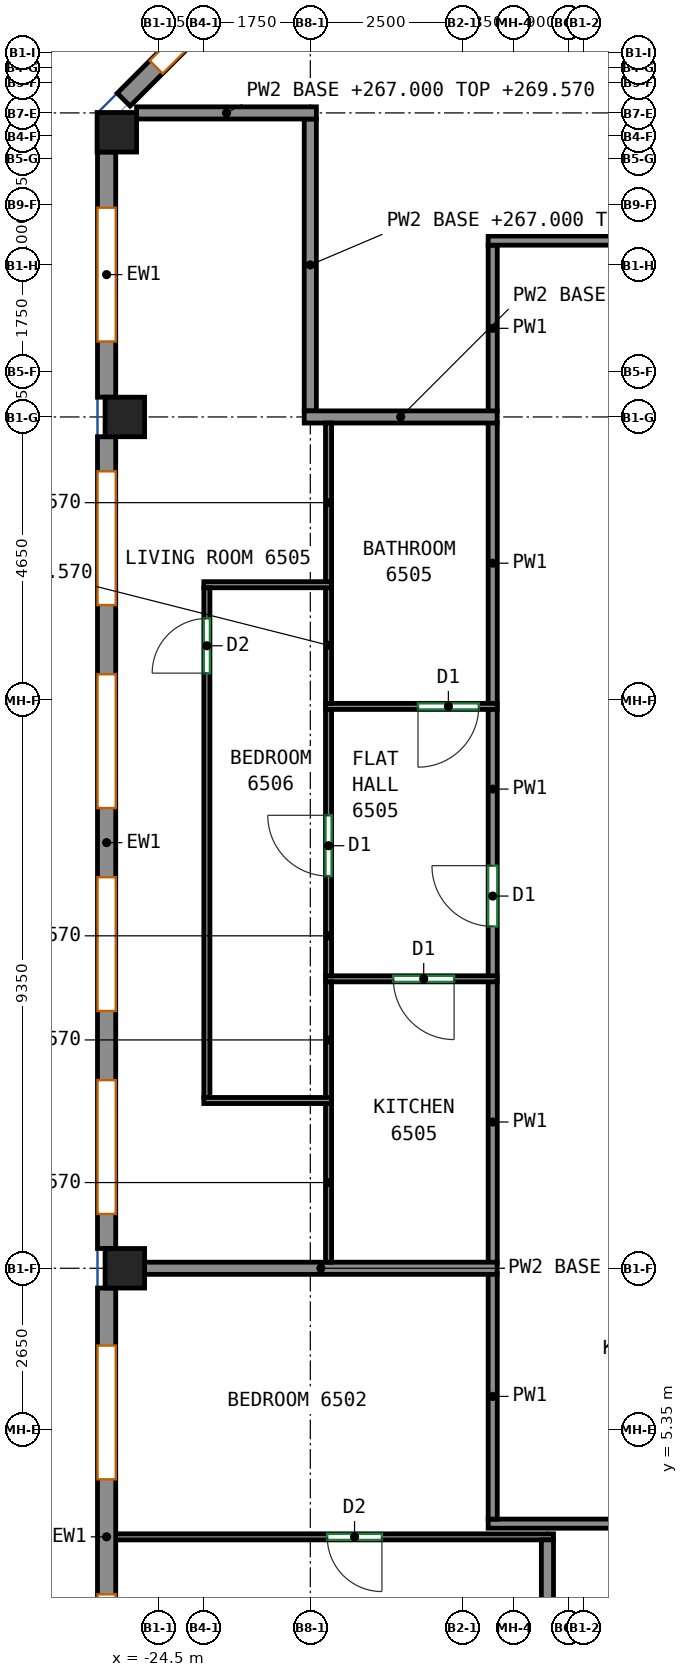
"""IFC4 building model, lengths in metres.
Left out: names, types, materials, properties, quantities, classifications, styles, units other than length and angle.
Written with IfcOpenShell. Run it as: python <this file> out.ifc"""

import sys

from ifc_helpers import new_model, si_unit, direction, frame, frame_2d, origin, origin_2d, place, context, subcontext, project, spatial, rectangle, extrude, source, transform, mapped, element, fill, save


model = new_model("IFC4")
c1 = context("Model", 3, precision=1e-05, world=origin(), true_north=direction((0.0, 1.0)))
c2 = subcontext(c1, "Body", "Model", "MODEL_VIEW")
j1 = project(units=[si_unit("LENGTHUNIT", "METRE"), si_unit("PLANEANGLEUNIT", "RADIAN")], contexts=[c1])
p1 = place(None, origin())
s1 = spatial("IfcSite", under=j1, at=p1, CompositionType="ELEMENT")
p2 = place(p1, origin())
s2 = spatial("IfcBuilding", under=s1, at=p2, CompositionType="ELEMENT")
p3 = place(p2, frame((0.0, 0.0, 267.0)))
s3 = spatial("IfcBuildingStorey", under=s2, at=p3, CompositionType="ELEMENT", Elevation=267.0)
m1 = source(origin(), c2, "Body", "SweptSolid", [
    extrude(rectangle(XDim=0.65, YDim=0.65, at=origin_2d()), origin(), (0.0, 0.0, 1.0), 3.12),
])
for number, where, z_axis, x_axis in (
    (1, (-25.182, 26.682, 0.0), (0.0, 0.0, 1.0), (1.0, 0.0, 0.0)),
    (2, (-25.05, 8.0, 0.0), (0.0, 0.0, 1.0), (1.0, 0.0, 0.0)),
    (3, (-25.05, 22.0, 0.0), (0.0, 0.0, 1.0), (1.0, 0.0, 0.0)),
):
    element("IfcColumn", number, at=place(p3, frame(where, z_axis=z_axis, x_axis=x_axis)), inside=s3, PredefinedType="COLUMN", context=c2, shape_type="MappedRepresentation", body=[
        mapped(m1, transform((0.0, 0.0, 0.0))),
    ])
m2 = source(origin(), c2, "Body", "SweptSolid", [
    extrude(rectangle(XDim=3.712, YDim=0.3, at=frame_2d((1.856, 0.0))), origin(), (0.0, 0.0, 1.0), 3.12),
])
p4 = place(p3, frame((-22.444, 29.844, 0.0), z_axis=(0.0, 0.0, 1.0), x_axis=(-0.707106781187, -0.707106781187, 0.0)))
e4 = element("IfcWall", 4, at=p4, inside=s3, PredefinedType="SOLIDWALL", context=c2, shape_type="MappedRepresentation", body=[
    mapped(m2, transform((0.0, 0.0, 0.0))),
])
p5 = place(p4, frame((0.756, 0.0, 0.8)))
e5 = element("IfcOpeningElement", 5, at=p5, cuts=e4, PredefinedType="OPENING", context=c2, shape_type="SweptSolid", body=[
    extrude(rectangle(XDim=2.2, YDim=2.05, at=frame_2d((1.1, 1.025))), frame((0.0, 0.16, 0.0), z_axis=(0.0, -1.0, 0.0), x_axis=(1.0, 0.0, 0.0)), (0.0, 0.0, 1.0), 0.32),
])
m3 = source(origin(), c2, "Body", "SweptSolid", [
    extrude(rectangle(XDim=4.032, YDim=0.3, at=frame_2d((2.016, 0.0))), origin(), (0.0, 0.0, 1.0), 3.12),
])
p6 = place(p3, frame((-25.35, 26.357, 0.0), z_axis=(0.0, 0.0, 1.0), x_axis=(0.0, -1.0, 0.0)))
e6 = element("IfcWall", 6, at=p6, inside=s3, PredefinedType="SOLIDWALL", context=c2, shape_type="MappedRepresentation", body=[
    mapped(m3, transform((0.0, 0.0, 0.0))),
])
p7 = place(p6, frame((0.916, 0.0, 0.8)))
e7 = element("IfcOpeningElement", 7, at=p7, cuts=e6, PredefinedType="OPENING", context=c2, shape_type="SweptSolid", body=[
    extrude(rectangle(XDim=2.2, YDim=2.05, at=frame_2d((1.1, 1.025))), frame((0.0, 0.16, 0.0), z_axis=(0.0, -1.0, 0.0), x_axis=(1.0, 0.0, 0.0)), (0.0, 0.0, 1.0), 0.32),
])
m4 = source(origin(), c2, "Body", "SweptSolid", [
    extrude(rectangle(XDim=13.35, YDim=0.3, at=frame_2d((6.675, 0.0))), origin(), (0.0, 0.0, 1.0), 3.12),
])
p8 = place(p3, frame((-25.35, 21.675, 0.0), z_axis=(0.0, 0.0, 1.0), x_axis=(0.0, -1.0, 0.0)))
e8 = element("IfcWall", 8, at=p8, inside=s3, PredefinedType="SOLIDWALL", context=c2, shape_type="MappedRepresentation", body=[
    mapped(m4, transform((0.0, 0.0, 0.0))),
])
p9 = place(p8, frame((0.569, 0.0, 0.8)))
e9 = element("IfcOpeningElement", 9, at=p9, cuts=e8, PredefinedType="OPENING", context=c2, shape_type="SweptSolid", body=[
    extrude(rectangle(XDim=2.2, YDim=2.05, at=frame_2d((1.1, 1.025))), frame((0.0, 0.16, 0.0), z_axis=(0.0, -1.0, 0.0), x_axis=(1.0, 0.0, 0.0)), (0.0, 0.0, 1.0), 0.32),
])
p10 = place(p8, frame((3.906, 0.0, 0.8)))
e10 = element("IfcOpeningElement", 10, at=p10, cuts=e8, PredefinedType="OPENING", context=c2, shape_type="SweptSolid", body=[
    extrude(rectangle(XDim=2.2, YDim=2.05, at=frame_2d((1.1, 1.025))), frame((0.0, 0.16, 0.0), z_axis=(0.0, -1.0, 0.0), x_axis=(1.0, 0.0, 0.0)), (0.0, 0.0, 1.0), 0.32),
])
p11 = place(p8, frame((7.244, 0.0, 0.8)))
e11 = element("IfcOpeningElement", 11, at=p11, cuts=e8, PredefinedType="OPENING", context=c2, shape_type="SweptSolid", body=[
    extrude(rectangle(XDim=2.2, YDim=2.05, at=frame_2d((1.1, 1.025))), frame((0.0, 0.16, 0.0), z_axis=(0.0, -1.0, 0.0), x_axis=(1.0, 0.0, 0.0)), (0.0, 0.0, 1.0), 0.32),
])
p12 = place(p8, frame((10.581, 0.0, 0.8)))
e12 = element("IfcOpeningElement", 12, at=p12, cuts=e8, PredefinedType="OPENING", context=c2, shape_type="SweptSolid", body=[
    extrude(rectangle(XDim=2.2, YDim=2.05, at=frame_2d((1.1, 1.025))), frame((0.0, 0.16, 0.0), z_axis=(0.0, -1.0, 0.0), x_axis=(1.0, 0.0, 0.0)), (0.0, 0.0, 1.0), 0.32),
])
m5 = source(origin(), c2, "Body", "SweptSolid", [
    extrude(rectangle(XDim=8.183, YDim=0.3, at=frame_2d((4.092, 0.0))), origin(), (0.0, 0.0, 1.0), 3.12),
])
p13 = place(p3, frame((-25.35, 7.675, 0.0), z_axis=(0.0, 0.0, 1.0), x_axis=(0.0, -1.0, 0.0)))
e13 = element("IfcWall", 13, at=p13, inside=s3, PredefinedType="SOLIDWALL", context=c2, shape_type="MappedRepresentation", body=[
    mapped(m5, transform((0.0, 0.0, 0.0))),
])
p14 = place(p13, frame((0.946, 0.0, 0.8)))
e14 = element("IfcOpeningElement", 14, at=p14, cuts=e13, PredefinedType="OPENING", context=c2, shape_type="SweptSolid", body=[
    extrude(rectangle(XDim=2.2, YDim=2.05, at=frame_2d((1.1, 1.025))), frame((0.0, 0.16, 0.0), z_axis=(0.0, -1.0, 0.0), x_axis=(1.0, 0.0, 0.0)), (0.0, 0.0, 1.0), 0.32),
])
p15 = place(p13, frame((5.037, 0.0, 0.8)))
e15 = element("IfcOpeningElement", 15, at=p15, cuts=e13, PredefinedType="OPENING", context=c2, shape_type="SweptSolid", body=[
    extrude(rectangle(XDim=2.2, YDim=2.05, at=frame_2d((1.1, 1.025))), frame((0.0, 0.16, 0.0), z_axis=(0.0, -1.0, 0.0), x_axis=(1.0, 0.0, 0.0)), (0.0, 0.0, 1.0), 0.32),
])
p16 = place(p3, frame((-19.075, 3.8, 0.0), z_axis=(0.0, 0.0, 1.0), x_axis=(1.0, 0.0, 0.0)))
e16 = element("IfcWall", 16, at=p16, inside=s3, PredefinedType="PARTITIONING", context=c2, shape_type="SweptSolid", body=[
    extrude(rectangle(XDim=4.89, YDim=0.15, at=frame_2d((2.445, 0.0))), origin(), (0.0, 0.0, 1.0), 3.12),
])
p17 = place(p3, frame((-19.0, 3.875, 0.0), z_axis=(0.0, 0.0, 1.0), x_axis=(0.0, 1.0, 0.0)))
e17 = element("IfcWall", 17, at=p17, inside=s3, PredefinedType="PARTITIONING", context=c2, shape_type="SweptSolid", body=[
    extrude(rectangle(XDim=4.035, YDim=0.15, at=frame_2d((2.018, 0.0))), origin(), (0.0, 0.0, 1.0), 3.12),
])
p18 = place(p3, frame((-19.0, 22.09, 0.0), z_axis=(0.0, 0.0, 1.0), x_axis=(0.0, 1.0, 0.0)))
e18 = element("IfcWall", 18, at=p18, inside=s3, PredefinedType="PARTITIONING", context=c2, shape_type="SweptSolid", body=[
    extrude(rectangle(XDim=2.735, YDim=0.15, at=frame_2d((1.367, 0.0))), origin(), (0.0, 0.0, 1.0), 3.12),
])
p19 = place(p3, frame((-19.075, 24.9, 0.0), z_axis=(0.0, 0.0, 1.0), x_axis=(1.0, 0.0, 0.0)))
e19 = element("IfcWall", 19, at=p19, inside=s3, PredefinedType="PARTITIONING", context=c2, shape_type="SweptSolid", body=[
    extrude(rectangle(XDim=39.75, YDim=0.15, at=frame_2d((19.875, 0.0))), origin(), (0.0, 0.0, 1.0), 3.12),
])
p20 = place(p19, frame((8.674, 0.0, 0.0)))
e20 = element("IfcOpeningElement", 20, at=p20, cuts=e19, PredefinedType="OPENING", context=c2, shape_type="SweptSolid", body=[
    extrude(rectangle(XDim=0.9, YDim=2.1, at=frame_2d((0.45, 1.05))), frame((0.0, 0.085, 0.0), z_axis=(0.0, -1.0, 0.0), x_axis=(1.0, 0.0, 0.0)), (0.0, 0.0, 1.0), 0.17),
])
p21 = place(p19, frame((13.778, 0.0, 0.0)))
e21 = element("IfcOpeningElement", 21, at=p21, cuts=e19, PredefinedType="OPENING", context=c2, shape_type="SweptSolid", body=[
    extrude(rectangle(XDim=0.9, YDim=2.1, at=frame_2d((0.45, 1.05))), frame((0.0, 0.085, 0.0), z_axis=(0.0, -1.0, 0.0), x_axis=(1.0, 0.0, 0.0)), (0.0, 0.0, 1.0), 0.17),
])
p22 = place(p3, frame((-19.0, 8.09, 0.0), z_axis=(0.0, 0.0, 1.0), x_axis=(0.0, 1.0, 0.0)))
e22 = element("IfcWall", 22, at=p22, inside=s3, PredefinedType="PARTITIONING", context=c2, shape_type="SweptSolid", body=[
    extrude(rectangle(XDim=4.63, YDim=0.15, at=frame_2d((2.315, 0.0))), origin(), (0.0, 0.0, 1.0), 3.12),
])
p23 = place(p3, frame((-19.0, 12.8, 0.0), z_axis=(0.0, 0.0, 1.0), x_axis=(0.0, 1.0, 0.0)))
e23 = element("IfcWall", 23, at=p23, inside=s3, PredefinedType="PARTITIONING", context=c2, shape_type="SweptSolid", body=[
    extrude(rectangle(XDim=4.4, YDim=0.15, at=frame_2d((2.2, 0.0))), origin(), (0.0, 0.0, 1.0), 3.12),
])
p24 = place(p23, frame((0.821, 0.0, 0.0)))
e24 = element("IfcOpeningElement", 24, at=p24, cuts=e23, PredefinedType="OPENING", context=c2, shape_type="SweptSolid", body=[
    extrude(rectangle(XDim=1.0, YDim=2.1, at=frame_2d((0.5, 1.05))), frame((0.0, 0.085, 0.0), z_axis=(0.0, -1.0, 0.0), x_axis=(1.0, 0.0, 0.0)), (0.0, 0.0, 1.0), 0.17),
])
p25 = place(p3, frame((-19.0, 17.28, 0.0), z_axis=(0.0, 0.0, 1.0), x_axis=(0.0, 1.0, 0.0)))
e25 = element("IfcWall", 25, at=p25, inside=s3, PredefinedType="PARTITIONING", context=c2, shape_type="SweptSolid", body=[
    extrude(rectangle(XDim=4.63, YDim=0.15, at=frame_2d((2.315, 0.0))), origin(), (0.0, 0.0, 1.0), 3.12),
])
p26 = place(p3, frame((-18.0, 3.583, 0.0), z_axis=(0.0, 0.0, 1.0), x_axis=(-1.0, 0.0, 0.0)))
e26 = element("IfcWall", 26, at=p26, inside=s3, PredefinedType="PARTITIONING", context=c2, shape_type="SweptSolid", body=[
    extrude(rectangle(XDim=7.25, YDim=0.1, at=frame_2d((3.625, 0.0))), origin(), (0.0, 0.0, 1.0), 3.12),
])
p27 = place(p26, frame((2.822, 0.0, 0.0)))
e27 = element("IfcOpeningElement", 27, at=p27, cuts=e26, PredefinedType="OPENING", context=c2, shape_type="SweptSolid", body=[
    extrude(rectangle(XDim=0.9, YDim=2.1, at=frame_2d((0.45, 1.05))), frame((0.0, 0.06, 0.0), z_axis=(0.0, -1.0, 0.0), x_axis=(1.0, 0.0, 0.0)), (0.0, 0.0, 1.0), 0.12),
])
p28 = place(p3, frame((-18.1, -3.148, 0.0), z_axis=(0.0, 0.0, 1.0), x_axis=(0.0, 1.0, 0.0)))
e28 = element("IfcWall", 28, at=p28, inside=s3, PredefinedType="PARTITIONING", context=c2, shape_type="SweptSolid", body=[
    extrude(rectangle(XDim=6.681, YDim=0.2, at=frame_2d((3.34, 0.0))), origin(), (0.0, 0.0, 1.0), 3.12),
])
p29 = place(p3, frame((-24.725, 8.0, 0.0), z_axis=(0.0, 0.0, 1.0), x_axis=(1.0, 0.0, 0.0)))
e29 = element("IfcWall", 29, at=p29, inside=s3, PredefinedType="PARTITIONING", context=c2, shape_type="SweptSolid", body=[
    extrude(rectangle(XDim=5.798, YDim=0.2, at=frame_2d((2.899, 0.0))), origin(), (0.0, 0.0, 1.0), 2.57),
])
p30 = place(p3, frame((-22.0, 22.1, 0.0), z_axis=(0.0, 0.0, 1.0), x_axis=(0.0, 1.0, 0.0)))
e30 = element("IfcWall", 30, at=p30, inside=s3, PredefinedType="PARTITIONING", context=c2, shape_type="SweptSolid", body=[
    extrude(rectangle(XDim=4.8, YDim=0.2, at=frame_2d((2.4, 0.0))), origin(), (0.0, 0.0, 1.0), 2.57),
])
p31 = place(p3, frame((-24.857, 27.0, 0.0), z_axis=(0.0, 0.0, 1.0), x_axis=(1.0, 0.0, 0.0)))
e31 = element("IfcWall", 31, at=p31, inside=s3, PredefinedType="PARTITIONING", context=c2, shape_type="SweptSolid", body=[
    extrude(rectangle(XDim=2.957, YDim=0.2, at=frame_2d((1.479, 0.0))), origin(), (0.0, 0.0, 1.0), 2.57),
])
p32 = place(p3, frame((-22.1, 22.0, 0.0), z_axis=(0.0, 0.0, 1.0), x_axis=(1.0, 0.0, 0.0)))
e32 = element("IfcWall", 32, at=p32, inside=s3, PredefinedType="PARTITIONING", context=c2, shape_type="SweptSolid", body=[
    extrude(rectangle(XDim=3.173, YDim=0.2, at=frame_2d((1.586, 0.0))), origin(), (0.0, 0.0, 1.0), 2.57),
])
p33 = place(p3, frame((-18.927, 12.76, 0.0), z_axis=(0.0, 0.0, 1.0), x_axis=(-1.0, 0.0, 0.0)))
e33 = element("IfcWall", 33, at=p33, inside=s3, PredefinedType="PARTITIONING", context=c2, shape_type="SweptSolid", body=[
    extrude(rectangle(XDim=2.823, YDim=0.1, at=frame_2d((1.412, 0.0))), origin(), (0.0, 0.0, 1.0), 3.12),
])
p34 = place(p33, frame((0.708, 0.0, 0.0)))
e34 = element("IfcOpeningElement", 34, at=p34, cuts=e33, PredefinedType="OPENING", context=c2, shape_type="SweptSolid", body=[
    extrude(rectangle(XDim=1.0, YDim=2.1, at=frame_2d((0.5, 1.05))), frame((0.0, 0.06, 0.0), z_axis=(0.0, -1.0, 0.0), x_axis=(1.0, 0.0, 0.0)), (0.0, 0.0, 1.0), 0.12),
])
p35 = place(p3, frame((-21.7, 8.1, 0.0), z_axis=(0.0, 0.0, 1.0), x_axis=(0.0, 1.0, 0.0)))
e35 = element("IfcWall", 35, at=p35, inside=s3, PredefinedType="PARTITIONING", context=c2, shape_type="SweptSolid", body=[
    extrude(rectangle(XDim=2.619, YDim=0.1, at=frame_2d((1.31, 0.0))), origin(), (0.0, 0.0, 1.0), 2.57),
])
p36 = place(p3, frame((-21.7, 10.8, 0.0), z_axis=(0.0, 0.0, 1.0), x_axis=(0.0, 1.0, 0.0)))
e36 = element("IfcWall", 36, at=p36, inside=s3, PredefinedType="PARTITIONING", context=c2, shape_type="SweptSolid", body=[
    extrude(rectangle(XDim=1.91, YDim=0.1, at=frame_2d((0.955, 0.0))), origin(), (0.0, 0.0, 1.0), 2.57),
])
p37 = place(p3, frame((-18.927, 17.24, 0.0), z_axis=(0.0, 0.0, 1.0), x_axis=(-1.0, 0.0, 0.0)))
e37 = element("IfcWall", 37, at=p37, inside=s3, PredefinedType="PARTITIONING", context=c2, shape_type="SweptSolid", body=[
    extrude(rectangle(XDim=2.823, YDim=0.1, at=frame_2d((1.412, 0.0))), origin(), (0.0, 0.0, 1.0), 3.12),
])
p38 = place(p37, frame((0.302, 0.0, 0.0)))
e38 = element("IfcOpeningElement", 38, at=p38, cuts=e37, PredefinedType="OPENING", context=c2, shape_type="SweptSolid", body=[
    extrude(rectangle(XDim=1.0, YDim=2.1, at=frame_2d((0.5, 1.05))), frame((0.0, 0.06, 0.0), z_axis=(0.0, -1.0, 0.0), x_axis=(1.0, 0.0, 0.0)), (0.0, 0.0, 1.0), 0.12),
])
p39 = place(p3, frame((-21.7, 12.81, 0.0), z_axis=(0.0, 0.0, 1.0), x_axis=(0.0, 1.0, 0.0)))
e39 = element("IfcWall", 39, at=p39, inside=s3, PredefinedType="PARTITIONING", context=c2, shape_type="SweptSolid", body=[
    extrude(rectangle(XDim=4.38, YDim=0.1, at=frame_2d((2.19, 0.0))), origin(), (0.0, 0.0, 1.0), 2.57),
])
p40 = place(p39, frame((1.639, 0.0, 0.0)))
e40 = element("IfcOpeningElement", 40, at=p40, cuts=e39, PredefinedType="OPENING", context=c2, shape_type="SweptSolid", body=[
    extrude(rectangle(XDim=1.0, YDim=2.1, at=frame_2d((0.5, 1.05))), frame((0.0, 0.06, 0.0), z_axis=(0.0, -1.0, 0.0), x_axis=(1.0, 0.0, 0.0)), (0.0, 0.0, 1.0), 0.12),
])
p41 = place(p3, frame((-21.7, 19.281, 0.0), z_axis=(0.0, 0.0, 1.0), x_axis=(0.0, 1.0, 0.0)))
e41 = element("IfcWall", 41, at=p41, inside=s3, PredefinedType="PARTITIONING", context=c2, shape_type="SweptSolid", body=[
    extrude(rectangle(XDim=2.619, YDim=0.1, at=frame_2d((1.31, 0.0))), origin(), (0.0, 0.0, 1.0), 2.57),
])
p42 = place(p3, frame((-21.7, 17.29, 0.0), z_axis=(0.0, 0.0, 1.0), x_axis=(0.0, 1.0, 0.0)))
e42 = element("IfcWall", 42, at=p42, inside=s3, PredefinedType="PARTITIONING", context=c2, shape_type="SweptSolid", body=[
    extrude(rectangle(XDim=1.91, YDim=0.1, at=frame_2d((0.955, 0.0))), origin(), (0.0, 0.0, 1.0), 2.57),
])
p43 = place(p3, frame((-23.751, 19.241, 0.0), z_axis=(0.0, 0.0, 1.0), x_axis=(1.0, 0.0, 0.0)))
e43 = element("IfcWall", 43, at=p43, inside=s3, PredefinedType="PARTITIONING", context=c2, shape_type="SweptSolid", body=[
    extrude(rectangle(XDim=2.099, YDim=0.1, at=frame_2d((1.049, 0.0))), origin(), (0.0, 0.0, 1.0), 3.12),
])
p44 = place(p3, frame((-23.701, 10.809, 0.0), z_axis=(0.0, 0.0, 1.0), x_axis=(0.0, 1.0, 0.0)))
e44 = element("IfcWall", 44, at=p44, inside=s3, PredefinedType="PARTITIONING", context=c2, shape_type="SweptSolid", body=[
    extrude(rectangle(XDim=8.382, YDim=0.1, at=frame_2d((4.191, 0.0))), origin(), (0.0, 0.0, 1.0), 3.12),
])
p45 = place(p44, frame((6.978, 0.0, 0.0)))
e45 = element("IfcOpeningElement", 45, at=p45, cuts=e44, PredefinedType="OPENING", context=c2, shape_type="SweptSolid", body=[
    extrude(rectangle(XDim=0.9, YDim=2.1, at=frame_2d((0.45, 1.05))), frame((0.0, 0.06, 0.0), z_axis=(0.0, -1.0, 0.0), x_axis=(1.0, 0.0, 0.0)), (0.0, 0.0, 1.0), 0.12),
])
p46 = place(p3, frame((-21.652, 10.759, 0.0), z_axis=(0.0, 0.0, 1.0), x_axis=(-1.0, 0.0, 0.0)))
e46 = element("IfcWall", 46, at=p46, inside=s3, PredefinedType="PARTITIONING", context=c2, shape_type="SweptSolid", body=[
    extrude(rectangle(XDim=2.099, YDim=0.1, at=frame_2d((1.049, 0.0))), origin(), (0.0, 0.0, 1.0), 3.12),
])
p47 = place(p5, origin())
e47 = element("IfcWindow", 47, at=p47, inside=s3, PartitioningType="SINGLE_PANEL", PredefinedType="WINDOW", context=c2, shape_type="SweptSolid", body=[
    extrude(rectangle(XDim=2.2, YDim=2.05, at=frame_2d((1.1, 1.025))), frame((0.0, 0.03, 0.0), z_axis=(0.0, -1.0, 0.0), x_axis=(1.0, 0.0, 0.0)), (0.0, 0.0, 1.0), 0.06),
])
fill(e5, e47)
p48 = place(p7, origin())
e48 = element("IfcWindow", 48, at=p48, inside=s3, PartitioningType="SINGLE_PANEL", PredefinedType="WINDOW", context=c2, shape_type="SweptSolid", body=[
    extrude(rectangle(XDim=2.2, YDim=2.05, at=frame_2d((1.1, 1.025))), frame((0.0, 0.03, 0.0), z_axis=(0.0, -1.0, 0.0), x_axis=(1.0, 0.0, 0.0)), (0.0, 0.0, 1.0), 0.06),
])
fill(e7, e48)
p49 = place(p9, origin())
e49 = element("IfcWindow", 49, at=p49, inside=s3, PartitioningType="SINGLE_PANEL", PredefinedType="WINDOW", context=c2, shape_type="SweptSolid", body=[
    extrude(rectangle(XDim=2.2, YDim=2.05, at=frame_2d((1.1, 1.025))), frame((0.0, 0.03, 0.0), z_axis=(0.0, -1.0, 0.0), x_axis=(1.0, 0.0, 0.0)), (0.0, 0.0, 1.0), 0.06),
])
fill(e9, e49)
p50 = place(p10, origin())
e50 = element("IfcWindow", 50, at=p50, inside=s3, PartitioningType="SINGLE_PANEL", PredefinedType="WINDOW", context=c2, shape_type="SweptSolid", body=[
    extrude(rectangle(XDim=2.2, YDim=2.05, at=frame_2d((1.1, 1.025))), frame((0.0, 0.03, 0.0), z_axis=(0.0, -1.0, 0.0), x_axis=(1.0, 0.0, 0.0)), (0.0, 0.0, 1.0), 0.06),
])
fill(e10, e50)
p51 = place(p11, origin())
e51 = element("IfcWindow", 51, at=p51, inside=s3, PartitioningType="SINGLE_PANEL", PredefinedType="WINDOW", context=c2, shape_type="SweptSolid", body=[
    extrude(rectangle(XDim=2.2, YDim=2.05, at=frame_2d((1.1, 1.025))), frame((0.0, 0.03, 0.0), z_axis=(0.0, -1.0, 0.0), x_axis=(1.0, 0.0, 0.0)), (0.0, 0.0, 1.0), 0.06),
])
fill(e11, e51)
p52 = place(p12, origin())
e52 = element("IfcWindow", 52, at=p52, inside=s3, PartitioningType="SINGLE_PANEL", PredefinedType="WINDOW", context=c2, shape_type="SweptSolid", body=[
    extrude(rectangle(XDim=2.2, YDim=2.05, at=frame_2d((1.1, 1.025))), frame((0.0, 0.03, 0.0), z_axis=(0.0, -1.0, 0.0), x_axis=(1.0, 0.0, 0.0)), (0.0, 0.0, 1.0), 0.06),
])
fill(e12, e52)
p53 = place(p14, origin())
e53 = element("IfcWindow", 53, at=p53, inside=s3, PartitioningType="SINGLE_PANEL", PredefinedType="WINDOW", context=c2, shape_type="SweptSolid", body=[
    extrude(rectangle(XDim=2.2, YDim=2.05, at=frame_2d((1.1, 1.025))), frame((0.0, 0.03, 0.0), z_axis=(0.0, -1.0, 0.0), x_axis=(1.0, 0.0, 0.0)), (0.0, 0.0, 1.0), 0.06),
])
fill(e14, e53)
p54 = place(p15, origin())
e54 = element("IfcWindow", 54, at=p54, inside=s3, PartitioningType="SINGLE_PANEL", PredefinedType="WINDOW", context=c2, shape_type="SweptSolid", body=[
    extrude(rectangle(XDim=2.2, YDim=2.05, at=frame_2d((1.1, 1.025))), frame((0.0, 0.03, 0.0), z_axis=(0.0, -1.0, 0.0), x_axis=(1.0, 0.0, 0.0)), (0.0, 0.0, 1.0), 0.06),
])
fill(e15, e54)
p55 = place(p27, origin())
e55 = element("IfcDoor", 55, at=p55, inside=s3, OperationType="SINGLE_SWING_LEFT", PredefinedType="DOOR", context=c2, shape_type="SweptSolid", body=[
    extrude(rectangle(XDim=0.9, YDim=2.1, at=frame_2d((0.45, 1.05))), frame((0.0, 0.025, 0.0), z_axis=(0.0, -1.0, 0.0), x_axis=(1.0, 0.0, 0.0)), (0.0, 0.0, 1.0), 0.05),
])
fill(e27, e55)
p56 = place(p34, origin())
e56 = element("IfcDoor", 56, at=p56, inside=s3, OperationType="SINGLE_SWING_LEFT", PredefinedType="DOOR", context=c2, shape_type="SweptSolid", body=[
    extrude(rectangle(XDim=1.0, YDim=2.1, at=frame_2d((0.5, 1.05))), frame((0.0, 0.025, 0.0), z_axis=(0.0, -1.0, 0.0), x_axis=(1.0, 0.0, 0.0)), (0.0, 0.0, 1.0), 0.05),
])
fill(e34, e56)
p57 = place(p24, origin())
e57 = element("IfcDoor", 57, at=p57, inside=s3, OperationType="SINGLE_SWING_RIGHT", PredefinedType="DOOR", context=c2, shape_type="SweptSolid", body=[
    extrude(rectangle(XDim=1.0, YDim=2.1, at=frame_2d((0.5, 1.05))), frame((0.0, 0.025, 0.0), z_axis=(0.0, -1.0, 0.0), x_axis=(1.0, 0.0, 0.0)), (0.0, 0.0, 1.0), 0.05),
])
fill(e24, e57)
p58 = place(p40, origin())
e58 = element("IfcDoor", 58, at=p58, inside=s3, OperationType="SINGLE_SWING_RIGHT", PredefinedType="DOOR", context=c2, shape_type="SweptSolid", body=[
    extrude(rectangle(XDim=1.0, YDim=2.1, at=frame_2d((0.5, 1.05))), frame((0.0, 0.025, 0.0), z_axis=(0.0, -1.0, 0.0), x_axis=(1.0, 0.0, 0.0)), (0.0, 0.0, 1.0), 0.05),
])
fill(e40, e58)
p59 = place(p38, origin())
e59 = element("IfcDoor", 59, at=p59, inside=s3, OperationType="SINGLE_SWING_RIGHT", PredefinedType="DOOR", context=c2, shape_type="SweptSolid", body=[
    extrude(rectangle(XDim=1.0, YDim=2.1, at=frame_2d((0.5, 1.05))), frame((0.0, 0.025, 0.0), z_axis=(0.0, -1.0, 0.0), x_axis=(1.0, 0.0, 0.0)), (0.0, 0.0, 1.0), 0.05),
])
fill(e38, e59)
p60 = place(p45, origin())
e60 = element("IfcDoor", 60, at=p60, inside=s3, OperationType="SINGLE_SWING_LEFT", PredefinedType="DOOR", context=c2, shape_type="SweptSolid", body=[
    extrude(rectangle(XDim=0.9, YDim=2.1, at=frame_2d((0.45, 1.05))), frame((0.0, 0.025, 0.0), z_axis=(0.0, -1.0, 0.0), x_axis=(1.0, 0.0, 0.0)), (0.0, 0.0, 1.0), 0.05),
])
fill(e45, e60)
save(model, sys.argv[1])
